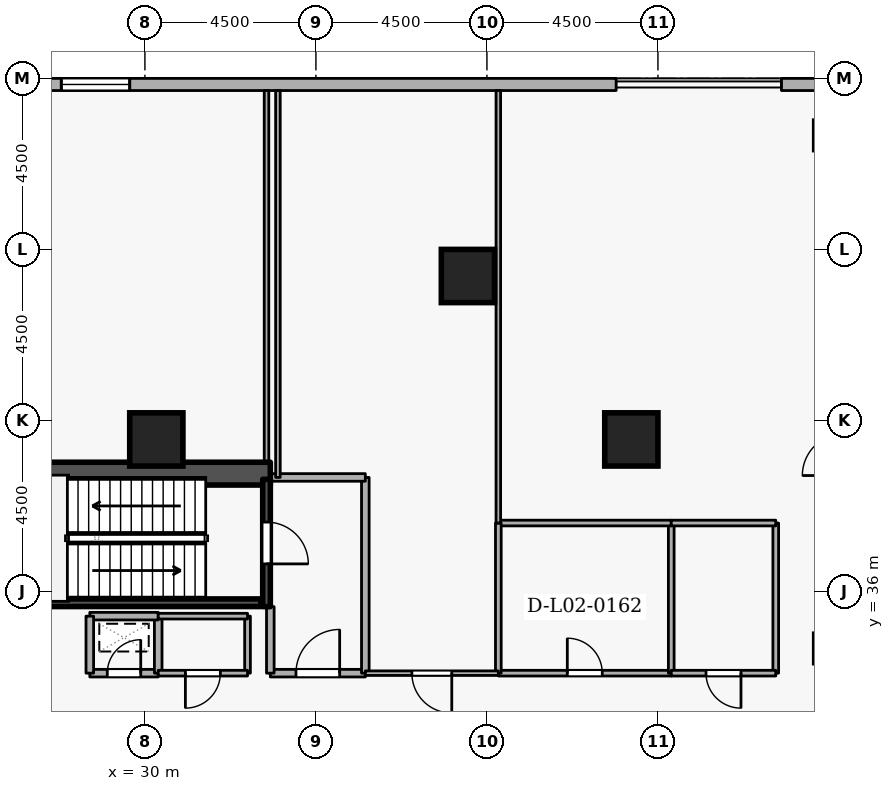
"""IFC4 building model, lengths in metres.
Left out: names, types, materials, properties, quantities, classifications, styles, units other than length and angle.
Written with IfcOpenShell. Run it as: python <this file> out.ifc"""

import sys

from ifc_helpers import new_model, si_unit, direction, frame, frame_2d, origin, origin_2d, place, context, subcontext, project, spatial, rectangle, extrude, element, fill, save


model = new_model("IFC4")
c1 = context("Model", 3, precision=1e-05, world=origin(), true_north=direction((0.0, 1.0)))
c2 = subcontext(c1, "Body", "Model", "MODEL_VIEW")
j1 = project(units=[si_unit("LENGTHUNIT", "METRE"), si_unit("PLANEANGLEUNIT", "RADIAN")], contexts=[c1])
p1 = place(None, origin())
s1 = spatial("IfcSite", under=j1, at=p1, CompositionType="ELEMENT")
p2 = place(p1, origin())
s2 = spatial("IfcBuilding", under=s1, at=p2, CompositionType="ELEMENT")
p3 = place(p2, frame((0.0, 0.0, 9.6)))
s3 = spatial("IfcBuildingStorey", under=s2, at=p3, CompositionType="ELEMENT", Elevation=9.6)
p4 = place(p3, frame((17.7, 39.1, 0.0), z_axis=(0.0, 0.0, 1.0), x_axis=(1.0, 0.0, 0.0)))
e1 = element("IfcWall", 1, at=p4, inside=s3, PredefinedType="SHEAR", context=c2, shape_type="SweptSolid", body=[
    extrude(rectangle(XDim=15.6, YDim=0.6, at=frame_2d((7.8, 0.0))), origin(), (0.0, 0.0, 1.0), 4.5),
])
for number, where, z_axis, x_axis in (
    (2, (42.8, 40.0, 0.0), (0.0, 0.0, 1.0), (1.0, 0.0, 0.0)),
    (3, (38.5, 44.3, 0.0), (0.0, 0.0, 1.0), (1.0, 0.0, 0.0)),
    (4, (30.3, 40.0, 0.0), (0.0, 0.0, 1.0), (1.0, 0.0, 0.0)),
):
    element("IfcColumn", number, at=place(p3, frame(where, z_axis=z_axis, x_axis=x_axis)), inside=s3, PredefinedType="COLUMN", context=c2, shape_type="SweptSolid", body=[
        extrude(rectangle(XDim=1.4, YDim=1.4, at=origin_2d()), origin(), (0.0, 0.0, 1.0), 4.5),
    ])
p5 = place(p3, frame((49.25, 49.34, 0.0), z_axis=(0.0, 0.0, 1.0), x_axis=(-1.0, 0.0, 0.0)))
e5 = element("IfcWall", 5, at=p5, inside=s3, PredefinedType="STANDARD", context=c2, shape_type="SweptSolid", body=[
    extrude(rectangle(XDim=2.5, YDim=0.32, at=frame_2d((1.25, 0.0))), origin(), (0.0, 0.0, 1.0), 3.56),
])
p6 = place(p3, frame((42.4, 49.34, 0.0), z_axis=(0.0, 0.0, 1.0), x_axis=(-1.0, 0.0, 0.0)))
e6 = element("IfcWall", 6, at=p6, inside=s3, PredefinedType="STANDARD", context=c2, shape_type="SweptSolid", body=[
    extrude(rectangle(XDim=39.4, YDim=0.32, at=frame_2d((19.7, 0.0))), origin(), (0.0, 0.0, 1.0), 3.56),
])
p7 = place(p6, frame((12.8, 0.0, 0.78)))
e7 = element("IfcOpeningElement", 7, at=p7, cuts=e6, PredefinedType="OPENING", context=c2, shape_type="SweptSolid", body=[
    extrude(rectangle(XDim=1.8, YDim=2.15, at=frame_2d((0.9, 1.075))), frame((0.0, 0.17, 0.0), z_axis=(0.0, -1.0, 0.0), x_axis=(1.0, 0.0, 0.0)), (0.0, 0.0, 1.0), 0.34),
])
p8 = place(p6, frame((22.8, 0.0, 0.78)))
e8 = element("IfcOpeningElement", 8, at=p8, cuts=e6, PredefinedType="OPENING", context=c2, shape_type="SweptSolid", body=[
    extrude(rectangle(XDim=1.8, YDim=2.15, at=frame_2d((0.9, 1.075))), frame((0.0, 0.17, 0.0), z_axis=(0.0, -1.0, 0.0), x_axis=(1.0, 0.0, 0.0)), (0.0, 0.0, 1.0), 0.34),
])
p9 = place(p3, frame((33.2, 38.95, 0.0), z_axis=(0.0, 0.0, 1.0), x_axis=(0.0, -1.0, 0.0)))
e9 = element("IfcWall", 9, at=p9, inside=s3, PredefinedType="SHEAR", context=c2, shape_type="SweptSolid", body=[
    extrude(rectangle(XDim=3.35, YDim=0.2, at=frame_2d((1.675, 0.0))), origin(), (0.0, 0.0, 1.0), 4.5),
])
p10 = place(p9, frame((1.125, 0.0, 0.0)))
e10 = element("IfcOpeningElement", 10, at=p10, cuts=e9, PredefinedType="OPENING", context=c2, shape_type="SweptSolid", body=[
    extrude(rectangle(XDim=1.1, YDim=2.1, at=frame_2d((0.55, 1.05))), frame((0.0, 0.11, 0.0), z_axis=(0.0, -1.0, 0.0), x_axis=(1.0, 0.0, 0.0)), (0.0, 0.0, 1.0), 0.22),
])
p11 = place(p3, frame((25.95, 35.703, 0.0), z_axis=(0.0, 0.0, 1.0), x_axis=(1.0, 0.0, 0.0)))
e11 = element("IfcWall", 11, at=p11, inside=s3, PredefinedType="SHEAR", context=c2, shape_type="SweptSolid", body=[
    extrude(rectangle(XDim=7.1, YDim=0.2, at=frame_2d((3.55, 0.0))), origin(), (0.0, 0.0, 1.0), 4.5),
])
p12 = place(p3, frame((33.3, 33.85, 0.0), z_axis=(0.0, 0.0, 1.0), x_axis=(1.0, 0.0, 0.0)))
e12 = element("IfcWall", 12, at=p12, inside=s3, PredefinedType="STANDARD", context=c2, shape_type="SweptSolid", body=[
    extrude(rectangle(XDim=2.5, YDim=0.2, at=frame_2d((1.25, 0.0))), origin(), (0.0, 0.0, 1.0), 4.16),
])
p13 = place(p12, frame((0.675, 0.0, 0.0)))
e13 = element("IfcOpeningElement", 13, at=p13, cuts=e12, PredefinedType="OPENING", context=c2, shape_type="SweptSolid", body=[
    extrude(rectangle(XDim=1.15, YDim=2.1, at=frame_2d((0.575, 1.05))), frame((0.0, 0.11, 0.0), z_axis=(0.0, -1.0, 0.0), x_axis=(1.0, 0.0, 0.0)), (0.0, 0.0, 1.0), 0.22),
])
p14 = place(p3, frame((35.8, 33.85, 0.0), z_axis=(0.0, 0.0, 1.0), x_axis=(0.0, 1.0, 0.0)))
e14 = element("IfcWall", 14, at=p14, inside=s3, PredefinedType="STANDARD", context=c2, shape_type="SweptSolid", body=[
    extrude(rectangle(XDim=5.15, YDim=0.2, at=frame_2d((2.575, 0.0))), origin(), (0.0, 0.0, 1.0), 4.16),
])
p15 = place(p3, frame((35.8, 39.0, 0.0), z_axis=(0.0, 0.0, 1.0), x_axis=(-1.0, 0.0, 0.0)))
e15 = element("IfcWall", 15, at=p15, inside=s3, PredefinedType="STANDARD", context=c2, shape_type="SweptSolid", body=[
    extrude(rectangle(XDim=2.5, YDim=0.2, at=frame_2d((1.25, 0.0))), origin(), (0.0, 0.0, 1.0), 4.16),
])
p16 = place(p3, frame((33.3, 35.6, 0.0), z_axis=(0.0, 0.0, 1.0), x_axis=(0.0, -1.0, 0.0)))
e16 = element("IfcWall", 16, at=p16, inside=s3, PredefinedType="STANDARD", context=c2, shape_type="SweptSolid", body=[
    extrude(rectangle(XDim=1.75, YDim=0.2, at=frame_2d((0.875, 0.0))), origin(), (0.0, 0.0, 1.0), 3.365),
])
p17 = place(p3, frame((28.55, 33.85, 0.0), z_axis=(0.0, 0.0, 1.0), x_axis=(1.0, 0.0, 0.0)))
e17 = element("IfcWall", 17, at=p17, inside=s3, PredefinedType="STANDARD", context=c2, shape_type="SweptSolid", body=[
    extrude(rectangle(XDim=1.8, YDim=0.2, at=frame_2d((0.9, 0.0))), origin(), (0.0, 0.0, 1.0), 4.16),
])
p18 = place(p17, frame((0.46, 0.0, 0.0)))
e18 = element("IfcOpeningElement", 18, at=p18, cuts=e17, PredefinedType="OPENING", context=c2, shape_type="SweptSolid", body=[
    extrude(rectangle(XDim=0.88, YDim=2.04, at=frame_2d((0.44, 1.02))), frame((0.0, 0.11, 0.0), z_axis=(0.0, -1.0, 0.0), x_axis=(1.0, 0.0, 0.0)), (0.0, 0.0, 1.0), 0.22),
])
p19 = place(p3, frame((30.35, 33.85, 0.0), z_axis=(0.0, 0.0, 1.0), x_axis=(0.0, 1.0, 0.0)))
e19 = element("IfcWall", 19, at=p19, inside=s3, PredefinedType="STANDARD", context=c2, shape_type="SweptSolid", body=[
    extrude(rectangle(XDim=1.5, YDim=0.2, at=frame_2d((0.75, 0.0))), origin(), (0.0, 0.0, 1.0), 4.16),
])
p20 = place(p3, frame((30.35, 35.35, 0.0), z_axis=(0.0, 0.0, 1.0), x_axis=(-1.0, 0.0, 0.0)))
e20 = element("IfcWall", 20, at=p20, inside=s3, PredefinedType="STANDARD", context=c2, shape_type="SweptSolid", body=[
    extrude(rectangle(XDim=1.8, YDim=0.2, at=frame_2d((0.9, 0.0))), origin(), (0.0, 0.0, 1.0), 4.16),
])
p21 = place(p3, frame((28.55, 35.35, 0.0), z_axis=(0.0, 0.0, 1.0), x_axis=(0.0, -1.0, 0.0)))
e21 = element("IfcWall", 21, at=p21, inside=s3, PredefinedType="STANDARD", context=c2, shape_type="SweptSolid", body=[
    extrude(rectangle(XDim=1.5, YDim=0.2, at=frame_2d((0.75, 0.0))), origin(), (0.0, 0.0, 1.0), 4.16),
])
p22 = place(p3, frame((32.7, 35.35, 0.0), z_axis=(0.0, 0.0, 1.0), x_axis=(0.0, -1.0, 0.0)))
e22 = element("IfcWall", 22, at=p22, inside=s3, PredefinedType="PARTITIONING", context=c2, shape_type="SweptSolid", body=[
    extrude(rectangle(XDim=1.5, YDim=0.15, at=frame_2d((0.75, 0.0))), origin(), (0.0, 0.0, 1.0), 3.365),
])
p23 = place(p3, frame((32.7, 33.85, 0.0), z_axis=(0.0, 0.0, 1.0), x_axis=(-1.0, 0.0, 0.0)))
e23 = element("IfcWall", 23, at=p23, inside=s3, PredefinedType="PARTITIONING", context=c2, shape_type="SweptSolid", body=[
    extrude(rectangle(XDim=2.35, YDim=0.15, at=frame_2d((1.175, 0.0))), origin(), (0.0, 0.0, 1.0), 4.16),
])
p24 = place(p23, frame((0.715, 0.0, 0.0)))
e24 = element("IfcOpeningElement", 24, at=p24, cuts=e23, PredefinedType="OPENING", context=c2, shape_type="SweptSolid", body=[
    extrude(rectangle(XDim=0.92, YDim=2.08, at=frame_2d((0.46, 1.04))), frame((0.0, 0.085, 0.0), z_axis=(0.0, -1.0, 0.0), x_axis=(1.0, 0.0, 0.0)), (0.0, 0.0, 1.0), 0.17),
])
p25 = place(p3, frame((30.35, 35.35, 0.0), z_axis=(0.0, 0.0, 1.0), x_axis=(1.0, 0.0, 0.0)))
e25 = element("IfcWall", 25, at=p25, inside=s3, PredefinedType="PARTITIONING", context=c2, shape_type="SweptSolid", body=[
    extrude(rectangle(XDim=2.35, YDim=0.15, at=frame_2d((1.175, 0.0))), origin(), (0.0, 0.0, 1.0), 4.16),
])
p26 = place(p3, frame((39.3, 33.85, 0.0), z_axis=(0.0, 0.0, 1.0), x_axis=(1.0, 0.0, 0.0)))
e26 = element("IfcWall", 26, at=p26, inside=s3, PredefinedType="PARTITIONING", context=c2, shape_type="SweptSolid", body=[
    extrude(rectangle(XDim=4.55, YDim=0.15, at=frame_2d((2.275, 0.0))), origin(), (0.0, 0.0, 1.0), 4.16),
])
p27 = place(p26, frame((1.815, 0.0, 0.0)))
e27 = element("IfcOpeningElement", 27, at=p27, cuts=e26, PredefinedType="OPENING", context=c2, shape_type="SweptSolid", body=[
    extrude(rectangle(XDim=0.92, YDim=2.08, at=frame_2d((0.46, 1.04))), frame((0.0, 0.085, 0.0), z_axis=(0.0, -1.0, 0.0), x_axis=(1.0, 0.0, 0.0)), (0.0, 0.0, 1.0), 0.17),
])
p28 = place(p3, frame((43.85, 33.85, 0.0), z_axis=(0.0, 0.0, 1.0), x_axis=(0.0, 1.0, 0.0)))
e28 = element("IfcWall", 28, at=p28, inside=s3, PredefinedType="PARTITIONING", context=c2, shape_type="SweptSolid", body=[
    extrude(rectangle(XDim=3.95, YDim=0.15, at=frame_2d((1.975, 0.0))), origin(), (0.0, 0.0, 1.0), 4.16),
])
p29 = place(p3, frame((43.85, 37.8, 0.0), z_axis=(0.0, 0.0, 1.0), x_axis=(-1.0, 0.0, 0.0)))
e29 = element("IfcWall", 29, at=p29, inside=s3, PredefinedType="PARTITIONING", context=c2, shape_type="SweptSolid", body=[
    extrude(rectangle(XDim=4.55, YDim=0.15, at=frame_2d((2.275, 0.0))), origin(), (0.0, 0.0, 1.0), 4.16),
])
for number, where, z_axis, x_axis in (
    (30, (39.3, 37.8, 0.0), (0.0, 0.0, 1.0), (0.0, -1.0, 0.0)),
    (31, (46.6, 37.8, 0.0), (0.0, 0.0, 1.0), (0.0, -1.0, 0.0)),
):
    element("IfcWall", number, at=place(p3, frame(where, z_axis=z_axis, x_axis=x_axis)), inside=s3, PredefinedType="PARTITIONING", context=c2, shape_type="SweptSolid", body=[
        extrude(rectangle(XDim=3.95, YDim=0.15, at=frame_2d((1.975, 0.0))), origin(), (0.0, 0.0, 1.0), 4.16),
    ])
p30 = place(p3, frame((46.6, 33.85, 0.0), z_axis=(0.0, 0.0, 1.0), x_axis=(-1.0, 0.0, 0.0)))
e32 = element("IfcWall", 32, at=p30, inside=s3, PredefinedType="PARTITIONING", context=c2, shape_type="SweptSolid", body=[
    extrude(rectangle(XDim=2.75, YDim=0.15, at=frame_2d((1.375, 0.0))), origin(), (0.0, 0.0, 1.0), 4.16),
])
p31 = place(p30, frame((0.915, 0.0, 0.0)))
e33 = element("IfcOpeningElement", 33, at=p31, cuts=e32, PredefinedType="OPENING", context=c2, shape_type="SweptSolid", body=[
    extrude(rectangle(XDim=0.92, YDim=2.08, at=frame_2d((0.46, 1.04))), frame((0.0, 0.085, 0.0), z_axis=(0.0, -1.0, 0.0), x_axis=(1.0, 0.0, 0.0)), (0.0, 0.0, 1.0), 0.17),
])
p32 = place(p3, frame((43.85, 37.8, 0.0), z_axis=(0.0, 0.0, 1.0), x_axis=(1.0, 0.0, 0.0)))
e34 = element("IfcWall", 34, at=p32, inside=s3, PredefinedType="PARTITIONING", context=c2, shape_type="SweptSolid", body=[
    extrude(rectangle(XDim=2.75, YDim=0.15, at=frame_2d((1.375, 0.0))), origin(), (0.0, 0.0, 1.0), 4.16),
])
p33 = place(p3, frame((33.5, 39.0, 0.0), z_axis=(0.0, 0.0, 1.0), x_axis=(0.0, 1.0, 0.0)))
e35 = element("IfcWall", 35, at=p33, inside=s3, PredefinedType="PARTITIONING", context=c2, shape_type="SweptSolid", body=[
    extrude(rectangle(XDim=10.18, YDim=0.12, at=frame_2d((5.09, 0.0))), origin(), (0.0, 0.0, 1.0), 4.16),
])
p34 = place(p3, frame((39.3, 49.18, 0.0), z_axis=(0.0, 0.0, 1.0), x_axis=(0.0, -1.0, 0.0)))
e36 = element("IfcWall", 36, at=p34, inside=s3, PredefinedType="PARTITIONING", context=c2, shape_type="SweptSolid", body=[
    extrude(rectangle(XDim=11.38, YDim=0.12, at=frame_2d((5.69, 0.0))), origin(), (0.0, 0.0, 1.0), 4.16),
])
p35 = place(p3, frame((39.3, 33.85, 0.0), z_axis=(0.0, 0.0, 1.0), x_axis=(-1.0, 0.0, 0.0)))
e37 = element("IfcWall", 37, at=p35, inside=s3, PredefinedType="PARTITIONING", context=c2, shape_type="SweptSolid", body=[
    extrude(rectangle(XDim=3.5, YDim=0.12, at=frame_2d((1.75, 0.0))), origin(), (0.0, 0.0, 1.0), 4.16),
])
p36 = place(p35, frame((1.225, 0.0, 0.0)))
e38 = element("IfcOpeningElement", 38, at=p36, cuts=e37, PredefinedType="OPENING", context=c2, shape_type="SweptSolid", body=[
    extrude(rectangle(XDim=1.05, YDim=2.1, at=frame_2d((0.525, 1.05))), frame((0.0, 0.07, 0.0), z_axis=(0.0, -1.0, 0.0), x_axis=(1.0, 0.0, 0.0)), (0.0, 0.0, 1.0), 0.14),
])
p37 = place(p3, frame((33.2, 49.18, 0.0), z_axis=(0.0, 0.0, 1.0), x_axis=(0.0, -1.0, 0.0)))
e39 = element("IfcWall", 39, at=p37, inside=s3, PredefinedType="PARTITIONING", context=c2, shape_type="SweptSolid", body=[
    extrude(rectangle(XDim=9.98, YDim=0.12, at=frame_2d((4.99, 0.0))), origin(), (0.0, 0.0, 1.0), 4.16),
])
p38 = place(p7, origin())
e40 = element("IfcWindow", 40, at=p38, inside=s3, PartitioningType="SINGLE_PANEL", PredefinedType="WINDOW", context=c2, shape_type="SweptSolid", body=[
    extrude(rectangle(XDim=1.8, YDim=2.15, at=frame_2d((0.9, 1.075))), frame((0.0, 0.03, 0.0), z_axis=(0.0, -1.0, 0.0), x_axis=(1.0, 0.0, 0.0)), (0.0, 0.0, 1.0), 0.06),
])
fill(e7, e40)
p39 = place(p10, origin())
e41 = element("IfcDoor", 41, at=p39, inside=s3, OperationType="SINGLE_SWING_RIGHT", PredefinedType="DOOR", context=c2, shape_type="SweptSolid", body=[
    extrude(rectangle(XDim=1.1, YDim=2.1, at=frame_2d((0.55, 1.05))), frame((0.0, 0.025, 0.0), z_axis=(0.0, -1.0, 0.0), x_axis=(1.0, 0.0, 0.0)), (0.0, 0.0, 1.0), 0.05),
])
fill(e10, e41)
p40 = place(p13, origin())
e42 = element("IfcDoor", 42, at=p40, inside=s3, OperationType="SINGLE_SWING_RIGHT", PredefinedType="DOOR", context=c2, shape_type="SweptSolid", body=[
    extrude(rectangle(XDim=1.15, YDim=2.1, at=frame_2d((0.575, 1.05))), frame((0.0, 0.025, 0.0), z_axis=(0.0, -1.0, 0.0), x_axis=(1.0, 0.0, 0.0)), (0.0, 0.0, 1.0), 0.05),
])
fill(e13, e42)
p41 = place(p18, origin())
e43 = element("IfcDoor", 43, at=p41, inside=s3, OperationType="SINGLE_SWING_RIGHT", PredefinedType="DOOR", context=c2, shape_type="SweptSolid", body=[
    extrude(rectangle(XDim=0.88, YDim=2.04, at=frame_2d((0.44, 1.02))), frame((0.0, 0.025, 0.0), z_axis=(0.0, -1.0, 0.0), x_axis=(1.0, 0.0, 0.0)), (0.0, 0.0, 1.0), 0.05),
])
fill(e18, e43)
p42 = place(p24, origin())
e44 = element("IfcDoor", 44, at=p42, inside=s3, OperationType="SINGLE_SWING_RIGHT", PredefinedType="DOOR", context=c2, shape_type="SweptSolid", body=[
    extrude(rectangle(XDim=0.92, YDim=2.08, at=frame_2d((0.46, 1.04))), frame((0.0, 0.025, 0.0), z_axis=(0.0, -1.0, 0.0), x_axis=(1.0, 0.0, 0.0)), (0.0, 0.0, 1.0), 0.05),
])
fill(e24, e44)
p43 = place(p27, origin())
e45 = element("IfcDoor", 45, at=p43, inside=s3, OperationType="SINGLE_SWING_LEFT", PredefinedType="DOOR", context=c2, shape_type="SweptSolid", body=[
    extrude(rectangle(XDim=0.92, YDim=2.08, at=frame_2d((0.46, 1.04))), frame((0.0, 0.025, 0.0), z_axis=(0.0, -1.0, 0.0), x_axis=(1.0, 0.0, 0.0)), (0.0, 0.0, 1.0), 0.05),
])
fill(e27, e45)
p44 = place(p31, origin())
e46 = element("IfcDoor", 46, at=p44, inside=s3, OperationType="SINGLE_SWING_LEFT", PredefinedType="DOOR", context=c2, shape_type="SweptSolid", body=[
    extrude(rectangle(XDim=0.92, YDim=2.08, at=frame_2d((0.46, 1.04))), frame((0.0, 0.025, 0.0), z_axis=(0.0, -1.0, 0.0), x_axis=(1.0, 0.0, 0.0)), (0.0, 0.0, 1.0), 0.05),
])
fill(e33, e46)
p45 = place(p36, origin())
e47 = element("IfcDoor", 47, at=p45, inside=s3, OperationType="SINGLE_SWING_LEFT", PredefinedType="DOOR", context=c2, shape_type="SweptSolid", body=[
    extrude(rectangle(XDim=1.05, YDim=2.1, at=frame_2d((0.525, 1.05))), frame((0.0, 0.025, 0.0), z_axis=(0.0, -1.0, 0.0), x_axis=(1.0, 0.0, 0.0)), (0.0, 0.0, 1.0), 0.05),
])
fill(e38, e47)
save(model, sys.argv[1])
